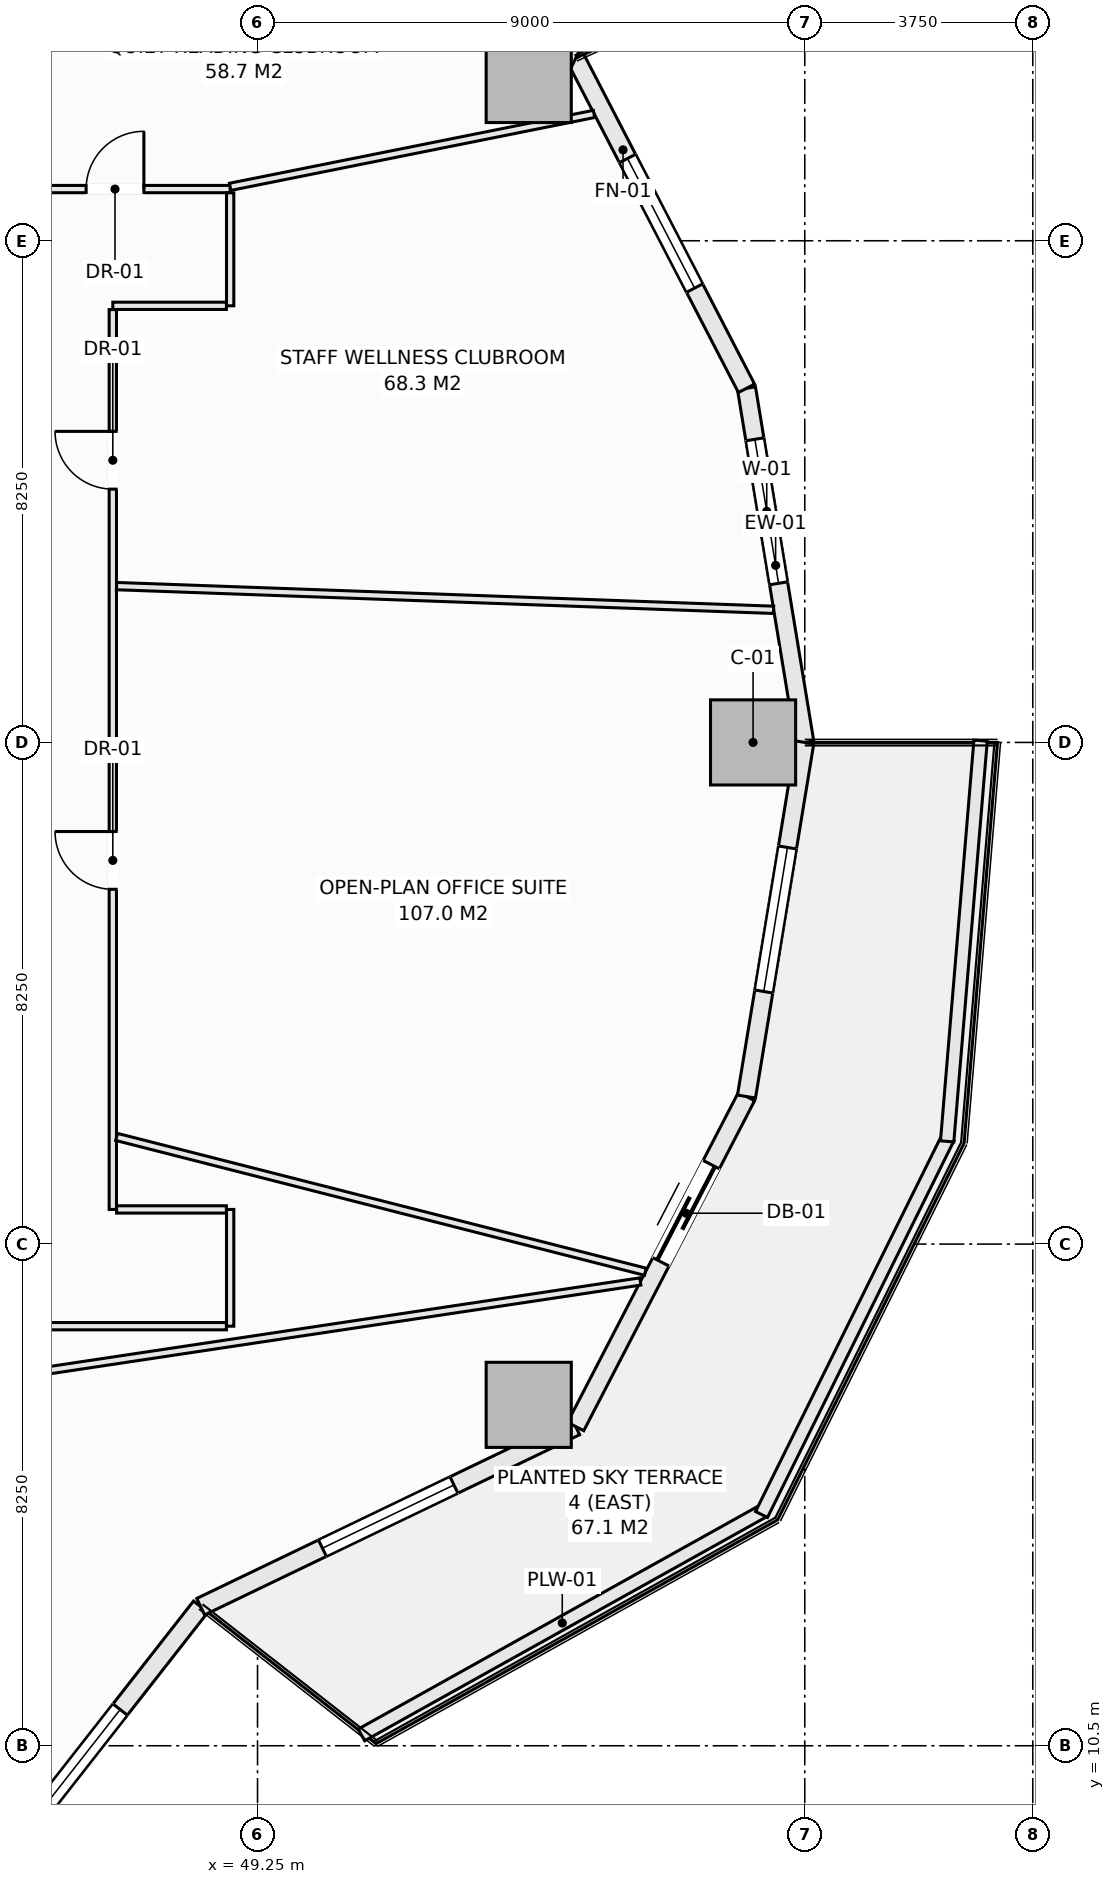
"""IFC4 building model, lengths in metres.
Left out: names, types, materials, properties, quantities, classifications, styles, units other than length and angle.
Written with IfcOpenShell. Run it as: python <this file> out.ifc"""

import sys

from ifc_helpers import new_model, si_unit, direction, frame, frame_2d, origin, origin_2d, place, context, subcontext, project, spatial, rectangle, extrude, element, fill, save


model = new_model("IFC4")
c1 = context("Model", 3, precision=1e-05, world=origin(), true_north=direction((0.0, 1.0)))
c2 = subcontext(c1, "Body", "Model", "MODEL_VIEW")
j1 = project(units=[si_unit("LENGTHUNIT", "METRE"), si_unit("PLANEANGLEUNIT", "RADIAN")], contexts=[c1])
p1 = place(None, origin())
s1 = spatial("IfcSite", under=j1, at=p1, CompositionType="ELEMENT")
p2 = place(p1, origin())
s2 = spatial("IfcBuilding", under=s1, at=p2, CompositionType="ELEMENT")
p3 = place(p2, frame((0.0, 0.0, 49.6)))
s3 = spatial("IfcBuildingStorey", under=s2, at=p3, CompositionType="ELEMENT", Elevation=49.6)
for number, where, z_axis, x_axis in (
    (1, (57.4, 27.0, -0.28), (0.0, 0.0, 1.0), (1.0, 0.0, 0.0)),
    (2, (53.71, 37.894, -0.28), (0.0, 0.0, 1.0), (1.0, 0.0, 0.0)),
    (3, (53.71, 16.106, -0.28), (0.0, 0.0, 1.0), (1.0, 0.0, 0.0)),
):
    element("IfcColumn", number, at=place(p3, frame(where, z_axis=z_axis, x_axis=x_axis)), inside=s3, PredefinedType="COLUMN", context=c2, shape_type="SweptSolid", body=[
        extrude(rectangle(XDim=1.4, YDim=1.4, at=origin_2d()), origin(), (0.0, 0.0, 1.0), 3.85),
    ])
p4 = place(p3, frame((57.292, 32.823, 0.0), z_axis=(0.0, 0.0, 1.0), x_axis=(0.162366057843, -0.98673059305, 0.0)))
e4 = element("IfcWall", 4, at=p4, inside=s3, PredefinedType="SOLIDWALL", context=c2, shape_type="SweptSolid", body=[
    extrude(rectangle(XDim=5.902, YDim=0.3, at=frame_2d((2.951, 0.0))), origin(), (0.0, 0.0, 1.0), 3.093),
])
p5 = place(p4, frame((0.85, 0.0, 0.85)))
e5 = element("IfcOpeningElement", 5, at=p5, cuts=e4, PredefinedType="OPENING", context=c2, shape_type="SweptSolid", body=[
    extrude(rectangle(XDim=2.4, YDim=1.9, at=frame_2d((1.2, 0.95))), frame((0.0, 0.16, 0.0), z_axis=(0.0, -1.0, 0.0), x_axis=(1.0, 0.0, 0.0)), (0.0, 0.0, 1.0), 0.32),
])
p6 = place(p3, frame((54.482, 38.25, 0.0), z_axis=(0.0, 0.0, 1.0), x_axis=(0.459809804413, -0.88801742312, 0.0)))
e6 = element("IfcWall", 6, at=p6, inside=s3, PredefinedType="SOLIDWALL", context=c2, shape_type="SweptSolid", body=[
    extrude(rectangle(XDim=6.111, YDim=0.3, at=frame_2d((3.055, 0.0))), origin(), (0.0, 0.0, 1.0), 3.093),
])
p7 = place(p6, frame((1.855, 0.0, 0.85)))
e7 = element("IfcOpeningElement", 7, at=p7, cuts=e6, PredefinedType="OPENING", context=c2, shape_type="SweptSolid", body=[
    extrude(rectangle(XDim=2.4, YDim=1.9, at=frame_2d((1.2, 0.95))), frame((0.0, 0.16, 0.0), z_axis=(0.0, -1.0, 0.0), x_axis=(1.0, 0.0, 0.0)), (0.0, 0.0, 1.0), 0.32),
])
p8 = place(p3, frame((48.315, 41.213, 0.0), z_axis=(0.0, 0.0, 1.0), x_axis=(0.901360393999, -0.433069786673, 0.0)))
e8 = element("IfcWall", 8, at=p8, inside=s3, PredefinedType="SOLIDWALL", context=c2, shape_type="SweptSolid", body=[
    extrude(rectangle(XDim=6.842, YDim=0.3, at=frame_2d((3.421, 0.0))), origin(), (0.0, 0.0, 1.0), 3.093),
])
p9 = place(p8, frame((0.724, 0.0, 0.85)))
e9 = element("IfcOpeningElement", 9, at=p9, cuts=e8, PredefinedType="OPENING", context=c2, shape_type="SweptSolid", body=[
    extrude(rectangle(XDim=1.2, YDim=1.9, at=frame_2d((0.6, 0.95))), frame((0.0, 0.16, 0.0), z_axis=(0.0, -1.0, 0.0), x_axis=(1.0, 0.0, 0.0)), (0.0, 0.0, 1.0), 0.32),
])
p10 = place(p8, frame((2.253, 0.0, 0.85)))
e10 = element("IfcOpeningElement", 10, at=p10, cuts=e8, PredefinedType="OPENING", context=c2, shape_type="SweptSolid", body=[
    extrude(rectangle(XDim=1.2, YDim=1.9, at=frame_2d((0.6, 0.95))), frame((0.0, 0.16, 0.0), z_axis=(0.0, -1.0, 0.0), x_axis=(1.0, 0.0, 0.0)), (0.0, 0.0, 1.0), 0.32),
])
p11 = place(p3, frame((44.188, 7.514, 0.0), z_axis=(0.0, 0.0, 1.0), x_axis=(0.616421309777, 0.787416515482, 0.0)))
e11 = element("IfcWall", 11, at=p11, inside=s3, PredefinedType="SOLIDWALL", context=c2, shape_type="SweptSolid", body=[
    extrude(rectangle(XDim=6.696, YDim=0.3, at=frame_2d((3.348, 0.0))), origin(), (0.0, 0.0, 1.0), 3.093),
])
p12 = place(p11, frame((2.148, 0.0, 0.85)))
e12 = element("IfcOpeningElement", 12, at=p12, cuts=e11, PredefinedType="OPENING", context=c2, shape_type="SweptSolid", body=[
    extrude(rectangle(XDim=2.4, YDim=1.9, at=frame_2d((1.2, 0.95))), frame((0.0, 0.16, 0.0), z_axis=(0.0, -1.0, 0.0), x_axis=(1.0, 0.0, 0.0)), (0.0, 0.0, 1.0), 0.32),
])
p13 = place(p3, frame((48.315, 12.787, 0.0), z_axis=(0.0, 0.0, 1.0), x_axis=(0.901360393999, 0.433069786673, 0.0)))
e13 = element("IfcWall", 13, at=p13, inside=s3, PredefinedType="SOLIDWALL", context=c2, shape_type="SweptSolid", body=[
    extrude(rectangle(XDim=6.842, YDim=0.3, at=frame_2d((3.421, 0.0))), origin(), (0.0, 0.0, 1.0), 3.093),
])
p14 = place(p13, frame((2.221, 0.0, 0.85)))
e14 = element("IfcOpeningElement", 14, at=p14, cuts=e13, PredefinedType="OPENING", context=c2, shape_type="SweptSolid", body=[
    extrude(rectangle(XDim=2.4, YDim=1.9, at=frame_2d((1.2, 0.95))), frame((0.0, 0.16, 0.0), z_axis=(0.0, -1.0, 0.0), x_axis=(1.0, 0.0, 0.0)), (0.0, 0.0, 1.0), 0.32),
])
p15 = place(p3, frame((54.482, 15.75, 0.0), z_axis=(0.0, 0.0, 1.0), x_axis=(0.459809804413, 0.88801742312, 0.0)))
e15 = element("IfcWall", 15, at=p15, inside=s3, PredefinedType="SOLIDWALL", context=c2, shape_type="SweptSolid", body=[
    extrude(rectangle(XDim=6.111, YDim=0.3, at=frame_2d((3.055, 0.0))), origin(), (0.0, 0.0, 1.0), 3.093),
])
p16 = place(p15, frame((3.05, 0.0, 0.0)))
e16 = element("IfcOpeningElement", 16, at=p16, cuts=e15, PredefinedType="OPENING", context=c2, shape_type="SweptSolid", body=[
    extrude(rectangle(XDim=1.8, YDim=2.25, at=frame_2d((0.9, 1.125))), frame((0.0, 0.16, 0.0), z_axis=(0.0, -1.0, 0.0), x_axis=(1.0, 0.0, 0.0)), (0.0, 0.0, 1.0), 0.32),
])
p17 = place(p3, frame((57.292, 21.177, 0.0), z_axis=(0.0, 0.0, 1.0), x_axis=(0.162366057843, 0.98673059305, 0.0)))
e17 = element("IfcWall", 17, at=p17, inside=s3, PredefinedType="SOLIDWALL", context=c2, shape_type="SweptSolid", body=[
    extrude(rectangle(XDim=5.902, YDim=0.3, at=frame_2d((2.951, 0.0))), origin(), (0.0, 0.0, 1.0), 3.093),
])
p18 = place(p17, frame((1.751, 0.0, 0.85)))
e18 = element("IfcOpeningElement", 18, at=p18, cuts=e17, PredefinedType="OPENING", context=c2, shape_type="SweptSolid", body=[
    extrude(rectangle(XDim=2.4, YDim=1.9, at=frame_2d((1.2, 0.95))), frame((0.0, 0.16, 0.0), z_axis=(0.0, -1.0, 0.0), x_axis=(1.0, 0.0, 0.0)), (0.0, 0.0, 1.0), 0.32),
])
p19 = place(p3, frame((50.959, 10.678, 0.0), z_axis=(0.0, 0.0, 1.0), x_axis=(0.873500119739, 0.48682393205, 0.0)))
e19 = element("IfcWall", 19, at=p19, inside=s3, PredefinedType="PARAPET", context=c2, shape_type="SweptSolid", body=[
    extrude(rectangle(XDim=7.562, YDim=0.22, at=frame_2d((3.781, 0.0))), origin(), (0.0, 0.0, 1.0), 0.52),
])
p20 = place(p3, frame((57.539, 14.303, 0.0), z_axis=(0.0, 0.0, 1.0), x_axis=(0.443578479433, 0.8962355341, 0.0)))
e20 = element("IfcWall", 20, at=p20, inside=s3, PredefinedType="PARAPET", context=c2, shape_type="SweptSolid", body=[
    extrude(rectangle(XDim=6.911, YDim=0.22, at=frame_2d((3.456, 0.0))), origin(), (0.0, 0.0, 1.0), 0.52),
])
p21 = place(p3, frame((60.592, 20.439, 0.0), z_axis=(0.0, 0.0, 1.0), x_axis=(0.08310047353, 0.996541173911, 0.0)))
e21 = element("IfcWall", 21, at=p21, inside=s3, PredefinedType="PARAPET", context=c2, shape_type="SweptSolid", body=[
    extrude(rectangle(XDim=6.613, YDim=0.22, at=frame_2d((3.307, 0.0))), origin(), (0.0, 0.0, 1.0), 0.52),
])
p22 = place(p3, frame((45.012, 36.1, 0.0), z_axis=(0.0, 0.0, 1.0), x_axis=(1.0, 0.0, 0.0)))
e22 = element("IfcWall", 22, at=p22, inside=s3, PredefinedType="PARTITIONING", context=c2, shape_type="SweptSolid", body=[
    extrude(rectangle(XDim=3.788, YDim=0.12, at=frame_2d((1.894, 0.0))), origin(), (0.0, 0.0, 1.0), 2.362),
])
p23 = place(p22, frame((1.419, 0.0, 0.0)))
e23 = element("IfcOpeningElement", 23, at=p23, cuts=e22, PredefinedType="OPENING", context=c2, shape_type="SweptSolid", body=[
    extrude(rectangle(XDim=0.95, YDim=2.1, at=frame_2d((0.475, 1.05))), frame((0.0, 0.07, 0.0), z_axis=(0.0, -1.0, 0.0), x_axis=(1.0, 0.0, 0.0)), (0.0, 0.0, 1.0), 0.14),
])
p24 = place(p3, frame((48.8, 17.4, 0.0), z_axis=(0.0, 0.0, 1.0), x_axis=(0.0, 1.0, 0.0)))
e24 = element("IfcWall", 24, at=p24, inside=s3, PredefinedType="PARTITIONING", context=c2, shape_type="SweptSolid", body=[
    extrude(rectangle(XDim=1.92, YDim=0.12, at=frame_2d((0.96, 0.0))), origin(), (0.0, 0.0, 1.0), 3.57),
])
p25 = place(p3, frame((48.8, 34.18, 0.0), z_axis=(0.0, 0.0, 1.0), x_axis=(0.0, 1.0, 0.0)))
e25 = element("IfcWall", 25, at=p25, inside=s3, PredefinedType="PARTITIONING", context=c2, shape_type="SweptSolid", body=[
    extrude(rectangle(XDim=1.858, YDim=0.12, at=frame_2d((0.929, 0.0))), origin(), (0.0, 0.0, 1.0), 3.57),
])
p26 = place(p3, frame((46.87, 34.18, 0.0), z_axis=(0.0, 0.0, 1.0), x_axis=(1.0, 0.0, 0.0)))
e26 = element("IfcWall", 26, at=p26, inside=s3, PredefinedType="PARTITIONING", context=c2, shape_type="SweptSolid", body=[
    extrude(rectangle(XDim=1.868, YDim=0.12, at=frame_2d((0.934, 0.0))), origin(), (0.0, 0.0, 1.0), 3.57),
])
p27 = place(p3, frame((46.87, 19.32, 0.0), z_axis=(0.0, 0.0, 1.0), x_axis=(0.0, 1.0, 0.0)))
e27 = element("IfcWall", 27, at=p27, inside=s3, PredefinedType="PARTITIONING", context=c2, shape_type="SweptSolid", body=[
    extrude(rectangle(XDim=14.798, YDim=0.12, at=frame_2d((7.399, 0.0))), origin(), (0.0, 0.0, 1.0), 3.57),
])
p28 = place(p27, frame((5.265, 0.0, 0.0)))
e28 = element("IfcOpeningElement", 28, at=p28, cuts=e27, PredefinedType="OPENING", context=c2, shape_type="SweptSolid", body=[
    extrude(rectangle(XDim=0.95, YDim=2.1, at=frame_2d((0.475, 1.05))), frame((0.0, 0.07, 0.0), z_axis=(0.0, -1.0, 0.0), x_axis=(1.0, 0.0, 0.0)), (0.0, 0.0, 1.0), 0.14),
])
p29 = place(p27, frame((11.845, 0.0, 0.0)))
e29 = element("IfcOpeningElement", 29, at=p29, cuts=e27, PredefinedType="OPENING", context=c2, shape_type="SweptSolid", body=[
    extrude(rectangle(XDim=0.95, YDim=2.1, at=frame_2d((0.475, 1.05))), frame((0.0, 0.07, 0.0), z_axis=(0.0, -1.0, 0.0), x_axis=(1.0, 0.0, 0.0)), (0.0, 0.0, 1.0), 0.14),
])
p30 = place(p3, frame((46.932, 19.32, 0.0), z_axis=(0.0, 0.0, 1.0), x_axis=(1.0, 0.0, 0.0)))
e30 = element("IfcWall", 30, at=p30, inside=s3, PredefinedType="PARTITIONING", context=c2, shape_type="SweptSolid", body=[
    extrude(rectangle(XDim=1.806, YDim=0.12, at=frame_2d((0.903, 0.0))), origin(), (0.0, 0.0, 1.0), 2.362),
])
p31 = place(p3, frame((45.012, 17.4, 0.0), z_axis=(0.0, 0.0, 1.0), x_axis=(1.0, 0.0, 0.0)))
e31 = element("IfcWall", 31, at=p31, inside=s3, PredefinedType="PARTITIONING", context=c2, shape_type="SweptSolid", body=[
    extrude(rectangle(XDim=3.726, YDim=0.12, at=frame_2d((1.863, 0.0))), origin(), (0.0, 0.0, 1.0), 3.57),
])
p32 = place(p3, frame((48.8, 36.137, 0.0), z_axis=(0.0, 0.0, 1.0), x_axis=(0.980512919928, 0.196454610165, 0.0)))
e32 = element("IfcWall", 32, at=p32, inside=s3, PredefinedType="PARTITIONING", context=c2, shape_type="SweptSolid", body=[
    extrude(rectangle(XDim=6.103, YDim=0.12, at=frame_2d((3.052, 0.0))), origin(), (0.0, 0.0, 1.0), 2.362),
])
p33 = place(p3, frame((46.932, 20.512, 0.0), z_axis=(0.0, 0.0, 1.0), x_axis=(0.969002278344, -0.247051785187, 0.0)))
e33 = element("IfcWall", 33, at=p33, inside=s3, PredefinedType="PARTITIONING", context=c2, shape_type="SweptSolid", body=[
    extrude(rectangle(XDim=8.975, YDim=0.12, at=frame_2d((4.488, 0.0))), origin(), (0.0, 0.0, 1.0), 3.57),
])
p34 = place(p3, frame((38.241, 15.537, 0.0), z_axis=(0.0, 0.0, 1.0), x_axis=(0.988910037188, 0.148515784849, 0.0)))
e34 = element("IfcWall", 34, at=p34, inside=s3, PredefinedType="PARTITIONING", context=c2, shape_type="SweptSolid", body=[
    extrude(rectangle(XDim=17.499, YDim=0.12, at=frame_2d((8.75, 0.0))), origin(), (0.0, 0.0, 1.0), 2.362),
])
p35 = place(p3, frame((46.932, 29.571, 0.0), z_axis=(0.0, 0.0, 1.0), x_axis=(0.999348798182, -0.036082954031, 0.0)))
e35 = element("IfcWall", 35, at=p35, inside=s3, PredefinedType="PARTITIONING", context=c2, shape_type="SweptSolid", body=[
    extrude(rectangle(XDim=10.812, YDim=0.12, at=frame_2d((5.406, 0.0))), origin(), (0.0, 0.0, 1.0), 3.57),
])
p36 = place(p3, frame((29.842, 34.058, 0.0), z_axis=(0.0, 0.0, 1.0), x_axis=(0.957798094038, 0.287441839435, 0.0)))
e36 = element("IfcWall", 36, at=p36, inside=s3, PredefinedType="PARTITIONING", context=c2, shape_type="SweptSolid", body=[
    extrude(rectangle(XDim=21.217, YDim=0.12, at=frame_2d((10.608, 0.0))), origin(), (0.0, 0.0, 1.0), 3.205),
])
p37 = place(p5, origin())
e37 = element("IfcWindow", 37, at=p37, inside=s3, PartitioningType="SINGLE_PANEL", PredefinedType="WINDOW", context=c2, shape_type="SweptSolid", body=[
    extrude(rectangle(XDim=2.4, YDim=1.9, at=frame_2d((1.2, 0.95))), frame((0.0, 0.03, 0.0), z_axis=(0.0, -1.0, 0.0), x_axis=(1.0, 0.0, 0.0)), (0.0, 0.0, 1.0), 0.06),
])
fill(e5, e37)
p38 = place(p7, origin())
e38 = element("IfcWindow", 38, at=p38, inside=s3, PartitioningType="SINGLE_PANEL", PredefinedType="WINDOW", context=c2, shape_type="SweptSolid", body=[
    extrude(rectangle(XDim=2.4, YDim=1.9, at=frame_2d((1.2, 0.95))), frame((0.0, 0.03, 0.0), z_axis=(0.0, -1.0, 0.0), x_axis=(1.0, 0.0, 0.0)), (0.0, 0.0, 1.0), 0.06),
])
fill(e7, e38)
p39 = place(p12, origin())
e39 = element("IfcWindow", 39, at=p39, inside=s3, PartitioningType="SINGLE_PANEL", PredefinedType="WINDOW", context=c2, shape_type="SweptSolid", body=[
    extrude(rectangle(XDim=2.4, YDim=1.9, at=frame_2d((1.2, 0.95))), frame((0.0, 0.03, 0.0), z_axis=(0.0, -1.0, 0.0), x_axis=(1.0, 0.0, 0.0)), (0.0, 0.0, 1.0), 0.06),
])
fill(e12, e39)
p40 = place(p14, origin())
e40 = element("IfcWindow", 40, at=p40, inside=s3, PartitioningType="SINGLE_PANEL", PredefinedType="WINDOW", context=c2, shape_type="SweptSolid", body=[
    extrude(rectangle(XDim=2.4, YDim=1.9, at=frame_2d((1.2, 0.95))), frame((0.0, 0.03, 0.0), z_axis=(0.0, -1.0, 0.0), x_axis=(1.0, 0.0, 0.0)), (0.0, 0.0, 1.0), 0.06),
])
fill(e14, e40)
p41 = place(p16, frame((1.8, 0.0, 0.0), z_axis=(0.0, 0.0, 1.0), x_axis=(-1.0, 0.0, 0.0)))
e41 = element("IfcDoor", 41, at=p41, inside=s3, OperationType="SLIDING_TO_LEFT", PredefinedType="DOOR", context=c2, shape_type="SweptSolid", body=[
    extrude(rectangle(XDim=1.8, YDim=2.25, at=frame_2d((0.9, 1.125))), frame((0.0, 0.025, 0.0), z_axis=(0.0, -1.0, 0.0), x_axis=(1.0, 0.0, 0.0)), (0.0, 0.0, 1.0), 0.05),
])
fill(e16, e41)
p42 = place(p18, origin())
e42 = element("IfcWindow", 42, at=p42, inside=s3, PartitioningType="SINGLE_PANEL", PredefinedType="WINDOW", context=c2, shape_type="SweptSolid", body=[
    extrude(rectangle(XDim=2.4, YDim=1.9, at=frame_2d((1.2, 0.95))), frame((0.0, 0.03, 0.0), z_axis=(0.0, -1.0, 0.0), x_axis=(1.0, 0.0, 0.0)), (0.0, 0.0, 1.0), 0.06),
])
fill(e18, e42)
p43 = place(p28, origin())
e43 = element("IfcDoor", 43, at=p43, inside=s3, OperationType="SINGLE_SWING_RIGHT", PredefinedType="DOOR", context=c2, shape_type="SweptSolid", body=[
    extrude(rectangle(XDim=0.95, YDim=2.1, at=frame_2d((0.475, 1.05))), frame((0.0, 0.025, 0.0), z_axis=(0.0, -1.0, 0.0), x_axis=(1.0, 0.0, 0.0)), (0.0, 0.0, 1.0), 0.05),
])
fill(e28, e43)
p44 = place(p29, origin())
e44 = element("IfcDoor", 44, at=p44, inside=s3, OperationType="SINGLE_SWING_RIGHT", PredefinedType="DOOR", context=c2, shape_type="SweptSolid", body=[
    extrude(rectangle(XDim=0.95, YDim=2.1, at=frame_2d((0.475, 1.05))), frame((0.0, 0.025, 0.0), z_axis=(0.0, -1.0, 0.0), x_axis=(1.0, 0.0, 0.0)), (0.0, 0.0, 1.0), 0.05),
])
fill(e29, e44)
p45 = place(p23, origin())
e45 = element("IfcDoor", 45, at=p45, inside=s3, OperationType="SINGLE_SWING_RIGHT", PredefinedType="DOOR", context=c2, shape_type="SweptSolid", body=[
    extrude(rectangle(XDim=0.95, YDim=2.1, at=frame_2d((0.475, 1.05))), frame((0.0, 0.025, 0.0), z_axis=(0.0, -1.0, 0.0), x_axis=(1.0, 0.0, 0.0)), (0.0, 0.0, 1.0), 0.05),
])
fill(e23, e45)
save(model, sys.argv[1])
